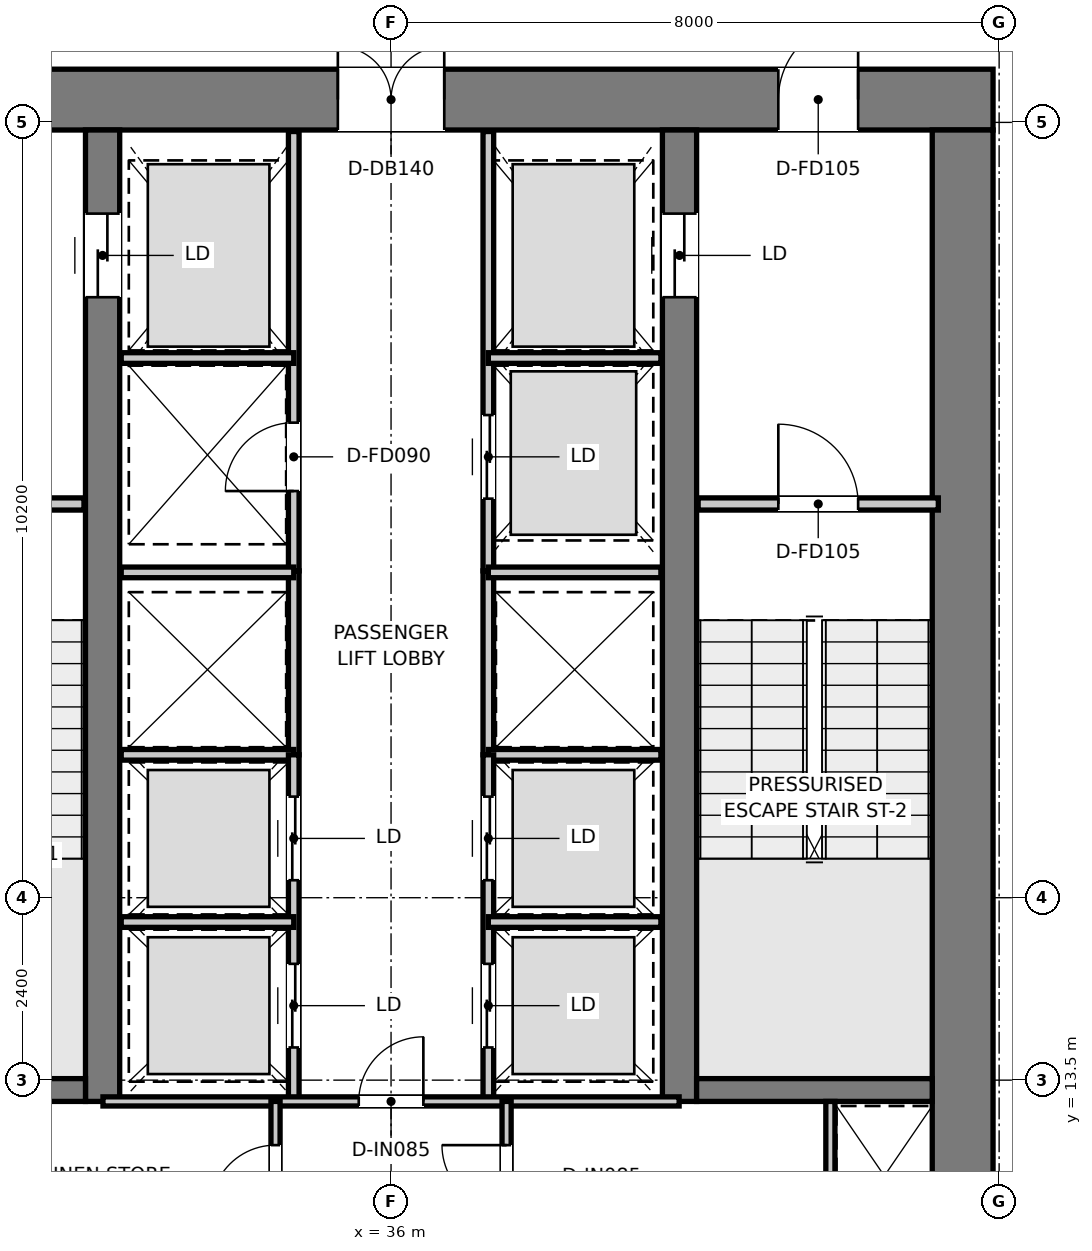
"""IFC4 building model, lengths in metres.
Left out: names, types, materials, properties, quantities, classifications, styles, units other than length and angle.
Written with IfcOpenShell. Run it as: python <this file> out.ifc"""

import sys

from ifc_helpers import new_model, si_unit, direction, frame, frame_2d, origin, place, context, subcontext, project, spatial, rectangle, extrude, element, fill, save


model = new_model("IFC4")
c1 = context("Model", 3, precision=1e-05, world=origin(), true_north=direction((0.0, 1.0)))
c2 = subcontext(c1, "Body", "Model", "MODEL_VIEW")
j1 = project(units=[si_unit("LENGTHUNIT", "METRE"), si_unit("PLANEANGLEUNIT", "RADIAN")], contexts=[c1])
p1 = place(None, origin())
s1 = spatial("IfcSite", under=j1, at=p1, CompositionType="ELEMENT")
p2 = place(p1, origin())
s2 = spatial("IfcBuilding", under=s1, at=p2, CompositionType="ELEMENT")
p3 = place(p2, frame((0.0, 0.0, 72.4)))
s3 = spatial("IfcBuildingStorey", under=s2, at=p3, CompositionType="ELEMENT", Elevation=72.4)
p4 = place(p3, frame((28.08, 26.4, 0.0), z_axis=(0.0, 0.0, 1.0), x_axis=(1.0, 0.0, 0.0)))
e1 = element("IfcWall", 1, at=p4, inside=s3, PredefinedType="SHEAR", context=c2, shape_type="SweptSolid", body=[
    extrude(rectangle(XDim=15.84, YDim=0.8, at=frame_2d((7.92, 0.0))), origin(), (0.0, 0.0, 1.0), 3.95),
])
p5 = place(p4, frame((7.22, 0.0, 0.0)))
e2 = element("IfcOpeningElement", 2, at=p5, cuts=e1, PredefinedType="OPENING", context=c2, shape_type="SweptSolid", body=[
    extrude(rectangle(XDim=1.4, YDim=2.2, at=frame_2d((0.7, 1.1))), frame((0.0, 0.41, 0.0), z_axis=(0.0, -1.0, 0.0), x_axis=(1.0, 0.0, 0.0)), (0.0, 0.0, 1.0), 0.82),
])
p6 = place(p4, frame((1.775, 0.0, 0.0)))
e3 = element("IfcOpeningElement", 3, at=p6, cuts=e1, PredefinedType="OPENING", context=c2, shape_type="SweptSolid", body=[
    extrude(rectangle(XDim=1.05, YDim=2.1, at=frame_2d((0.525, 1.05))), frame((0.0, 0.41, 0.0), z_axis=(0.0, -1.0, 0.0), x_axis=(1.0, 0.0, 0.0)), (0.0, 0.0, 1.0), 0.82),
])
p7 = place(p4, frame((13.015, 0.0, 0.0)))
e4 = element("IfcOpeningElement", 4, at=p7, cuts=e1, PredefinedType="OPENING", context=c2, shape_type="SweptSolid", body=[
    extrude(rectangle(XDim=1.05, YDim=2.1, at=frame_2d((0.525, 1.05))), frame((0.0, 0.41, 0.0), z_axis=(0.0, -1.0, 0.0), x_axis=(1.0, 0.0, 0.0)), (0.0, 0.0, 1.0), 0.82),
])
p8 = place(p3, frame((43.52, 11.3, 0.0), z_axis=(0.0, 0.0, 1.0), x_axis=(0.0, 1.0, 0.0)))
e5 = element("IfcWall", 5, at=p8, inside=s3, PredefinedType="SHEAR", context=c2, shape_type="SweptSolid", body=[
    extrude(rectangle(XDim=14.7, YDim=0.8, at=frame_2d((7.35, 0.0))), origin(), (0.0, 0.0, 1.0), 3.95),
])
p9 = place(p3, frame((32.205, 13.22, 0.0), z_axis=(0.0, 0.0, 1.0), x_axis=(0.0, 1.0, 0.0)))
e6 = element("IfcWall", 6, at=p9, inside=s3, PredefinedType="SHEAR", context=c2, shape_type="SweptSolid", body=[
    extrude(rectangle(XDim=12.78, YDim=0.45, at=frame_2d((6.39, 0.0))), origin(), (0.0, 0.0, 1.0), 3.95),
])
p10 = place(p9, frame((10.58, 0.0, 0.0)))
e7 = element("IfcOpeningElement", 7, at=p10, cuts=e6, PredefinedType="OPENING", context=c2, shape_type="SweptSolid", body=[
    extrude(rectangle(XDim=1.1, YDim=2.15, at=frame_2d((0.55, 1.075))), frame((0.0, 0.235, 0.0), z_axis=(0.0, -1.0, 0.0), x_axis=(1.0, 0.0, 0.0)), (0.0, 0.0, 1.0), 0.47),
])
p11 = place(p3, frame((39.795, 13.22, 0.0), z_axis=(0.0, 0.0, 1.0), x_axis=(0.0, 1.0, 0.0)))
e8 = element("IfcWall", 8, at=p11, inside=s3, PredefinedType="SHEAR", context=c2, shape_type="SweptSolid", body=[
    extrude(rectangle(XDim=12.78, YDim=0.45, at=frame_2d((6.39, 0.0))), origin(), (0.0, 0.0, 1.0), 3.95),
])
p12 = place(p11, frame((10.58, 0.0, 0.0)))
e9 = element("IfcOpeningElement", 9, at=p12, cuts=e8, PredefinedType="OPENING", context=c2, shape_type="SweptSolid", body=[
    extrude(rectangle(XDim=1.1, YDim=2.15, at=frame_2d((0.55, 1.075))), frame((0.0, 0.235, 0.0), z_axis=(0.0, -1.0, 0.0), x_axis=(1.0, 0.0, 0.0)), (0.0, 0.0, 1.0), 0.47),
])
for number, where, z_axis, x_axis in (
    (10, (28.88, 13.37, 0.0), (0.0, 0.0, 1.0), (1.0, 0.0, 0.0)),
    (11, (40.02, 13.37, 0.0), (0.0, 0.0, 1.0), (1.0, 0.0, 0.0)),
):
    element("IfcWall", number, at=place(p3, frame(where, z_axis=z_axis, x_axis=x_axis)), inside=s3, PredefinedType="SHEAR", context=c2, shape_type="SweptSolid", body=[
        extrude(rectangle(XDim=3.1, YDim=0.3, at=frame_2d((1.55, 0.0))), origin(), (0.0, 0.0, 1.0), 3.95),
    ])
p13 = place(p3, frame((28.8, 21.08, 0.0), z_axis=(0.0, 0.0, 1.0), x_axis=(1.0, 0.0, 0.0)))
e12 = element("IfcWall", 12, at=p13, inside=s3, PredefinedType="PARTITIONING", context=c2, shape_type="SweptSolid", body=[
    extrude(rectangle(XDim=3.16, YDim=0.16, at=frame_2d((1.58, 0.0))), origin(), (0.0, 0.0, 1.0), 3.67),
])
p14 = place(p13, frame((1.055, 0.0, 0.0)))
e13 = element("IfcOpeningElement", 13, at=p14, cuts=e12, PredefinedType="OPENING", context=c2, shape_type="SweptSolid", body=[
    extrude(rectangle(XDim=1.05, YDim=2.1, at=frame_2d((0.525, 1.05))), frame((0.0, 0.09, 0.0), z_axis=(0.0, -1.0, 0.0), x_axis=(1.0, 0.0, 0.0)), (0.0, 0.0, 1.0), 0.18),
])
p15 = place(p3, frame((40.04, 21.08, 0.0), z_axis=(0.0, 0.0, 1.0), x_axis=(1.0, 0.0, 0.0)))
e14 = element("IfcWall", 14, at=p15, inside=s3, PredefinedType="PARTITIONING", context=c2, shape_type="SweptSolid", body=[
    extrude(rectangle(XDim=3.16, YDim=0.16, at=frame_2d((1.58, 0.0))), origin(), (0.0, 0.0, 1.0), 3.67),
])
p16 = place(p15, frame((1.055, 0.0, 0.0)))
e15 = element("IfcOpeningElement", 15, at=p16, cuts=e14, PredefinedType="OPENING", context=c2, shape_type="SweptSolid", body=[
    extrude(rectangle(XDim=1.05, YDim=2.1, at=frame_2d((0.525, 1.05))), frame((0.0, 0.09, 0.0), z_axis=(0.0, -1.0, 0.0), x_axis=(1.0, 0.0, 0.0)), (0.0, 0.0, 1.0), 0.18),
])
p17 = place(p3, frame((34.72, 20.2, 0.0), z_axis=(0.0, 0.0, 1.0), x_axis=(0.0, 1.0, 0.0)))
e16 = element("IfcWall", 16, at=p17, inside=s3, PredefinedType="PARTITIONING", context=c2, shape_type="SweptSolid", body=[
    extrude(rectangle(XDim=5.78, YDim=0.14, at=frame_2d((2.89, 0.0))), origin(), (0.0, 0.0, 1.0), 2.47),
])
p18 = place(p17, frame((1.05, 0.0, 0.0)))
e17 = element("IfcOpeningElement", 17, at=p18, cuts=e16, PredefinedType="OPENING", context=c2, shape_type="SweptSolid", body=[
    extrude(rectangle(XDim=0.9, YDim=2.1, at=frame_2d((0.45, 1.05))), frame((0.0, 0.08, 0.0), z_axis=(0.0, -1.0, 0.0), x_axis=(1.0, 0.0, 0.0)), (0.0, 0.0, 1.0), 0.16),
])
p19 = place(p3, frame((37.28, 20.2, 0.0), z_axis=(0.0, 0.0, 1.0), x_axis=(0.0, 1.0, 0.0)))
e18 = element("IfcWall", 18, at=p19, inside=s3, PredefinedType="PARTITIONING", context=c2, shape_type="SweptSolid", body=[
    extrude(rectangle(XDim=5.78, YDim=0.14, at=frame_2d((2.89, 0.0))), origin(), (0.0, 0.0, 1.0), 2.47),
])
p20 = place(p19, frame((0.95, 0.0, 0.0)))
e19 = element("IfcOpeningElement", 19, at=p20, cuts=e18, PredefinedType="OPENING", context=c2, shape_type="SweptSolid", body=[
    extrude(rectangle(XDim=1.1, YDim=2.15, at=frame_2d((0.55, 1.075))), frame((0.0, 0.08, 0.0), z_axis=(0.0, -1.0, 0.0), x_axis=(1.0, 0.0, 0.0)), (0.0, 0.0, 1.0), 0.16),
])
for number, where, z_axis, x_axis in (
    (20, (32.45, 23.0, 0.0), (0.0, 0.0, 1.0), (1.0, 0.0, 0.0)),
    (21, (37.28, 23.0, 0.0), (0.0, 0.0, 1.0), (1.0, 0.0, 0.0)),
):
    element("IfcWall", number, at=place(p3, frame(where, z_axis=z_axis, x_axis=x_axis)), inside=s3, PredefinedType="PARTITIONING", context=c2, shape_type="SweptSolid", body=[
        extrude(rectangle(XDim=2.27, YDim=0.14, at=frame_2d((1.135, 0.0))), origin(), (0.0, 0.0, 1.0), 2.47),
    ])
for number, where, z_axis, x_axis in (
    (22, (34.72, 17.78, 0.0), (0.0, 0.0, 1.0), (0.0, 1.0, 0.0)),
    (23, (37.28, 17.78, 0.0), (0.0, 0.0, 1.0), (0.0, 1.0, 0.0)),
):
    element("IfcWall", number, at=place(p3, frame(where, z_axis=z_axis, x_axis=x_axis)), inside=s3, PredefinedType="PARTITIONING", context=c2, shape_type="SweptSolid", body=[
        extrude(rectangle(XDim=2.42, YDim=0.14, at=frame_2d((1.21, 0.0))), origin(), (0.0, 0.0, 1.0), 3.67),
    ])
for number, where, z_axis, x_axis in (
    (24, (32.45, 17.78, 0.0), (0.0, 0.0, 1.0), (1.0, 0.0, 0.0)),
    (25, (32.45, 20.18, 0.0), (0.0, 0.0, 1.0), (1.0, 0.0, 0.0)),
    (26, (37.28, 17.78, 0.0), (0.0, 0.0, 1.0), (1.0, 0.0, 0.0)),
    (27, (37.28, 20.18, 0.0), (0.0, 0.0, 1.0), (1.0, 0.0, 0.0)),
):
    element("IfcWall", number, at=place(p3, frame(where, z_axis=z_axis, x_axis=x_axis)), inside=s3, PredefinedType="PARTITIONING", context=c2, shape_type="SweptSolid", body=[
        extrude(rectangle(XDim=2.27, YDim=0.14, at=frame_2d((1.135, 0.0))), origin(), (0.0, 0.0, 1.0), 3.67),
    ])
p21 = place(p3, frame((34.72, 13.22, 0.0), z_axis=(0.0, 0.0, 1.0), x_axis=(0.0, 1.0, 0.0)))
e28 = element("IfcWall", 28, at=p21, inside=s3, PredefinedType="PARTITIONING", context=c2, shape_type="SweptSolid", body=[
    extrude(rectangle(XDim=4.56, YDim=0.14, at=frame_2d((2.28, 0.0))), origin(), (0.0, 0.0, 1.0), 3.67),
])
p22 = place(p21, frame((0.71, 0.0, 0.0)))
e29 = element("IfcOpeningElement", 29, at=p22, cuts=e28, PredefinedType="OPENING", context=c2, shape_type="SweptSolid", body=[
    extrude(rectangle(XDim=1.1, YDim=2.15, at=frame_2d((0.55, 1.075))), frame((0.0, 0.08, 0.0), z_axis=(0.0, -1.0, 0.0), x_axis=(1.0, 0.0, 0.0)), (0.0, 0.0, 1.0), 0.16),
])
p23 = place(p21, frame((2.91, 0.0, 0.0)))
e30 = element("IfcOpeningElement", 30, at=p23, cuts=e28, PredefinedType="OPENING", context=c2, shape_type="SweptSolid", body=[
    extrude(rectangle(XDim=1.1, YDim=2.15, at=frame_2d((0.55, 1.075))), frame((0.0, 0.08, 0.0), z_axis=(0.0, -1.0, 0.0), x_axis=(1.0, 0.0, 0.0)), (0.0, 0.0, 1.0), 0.16),
])
p24 = place(p3, frame((32.45, 15.58, 0.0), z_axis=(0.0, 0.0, 1.0), x_axis=(1.0, 0.0, 0.0)))
e31 = element("IfcWall", 31, at=p24, inside=s3, PredefinedType="PARTITIONING", context=c2, shape_type="SweptSolid", body=[
    extrude(rectangle(XDim=2.27, YDim=0.14, at=frame_2d((1.135, 0.0))), origin(), (0.0, 0.0, 1.0), 3.67),
])
p25 = place(p3, frame((37.28, 13.22, 0.0), z_axis=(0.0, 0.0, 1.0), x_axis=(0.0, 1.0, 0.0)))
e32 = element("IfcWall", 32, at=p25, inside=s3, PredefinedType="PARTITIONING", context=c2, shape_type="SweptSolid", body=[
    extrude(rectangle(XDim=4.56, YDim=0.14, at=frame_2d((2.28, 0.0))), origin(), (0.0, 0.0, 1.0), 3.67),
])
p26 = place(p25, frame((0.71, 0.0, 0.0)))
e33 = element("IfcOpeningElement", 33, at=p26, cuts=e32, PredefinedType="OPENING", context=c2, shape_type="SweptSolid", body=[
    extrude(rectangle(XDim=1.1, YDim=2.15, at=frame_2d((0.55, 1.075))), frame((0.0, 0.08, 0.0), z_axis=(0.0, -1.0, 0.0), x_axis=(1.0, 0.0, 0.0)), (0.0, 0.0, 1.0), 0.16),
])
p27 = place(p25, frame((2.91, 0.0, 0.0)))
e34 = element("IfcOpeningElement", 34, at=p27, cuts=e32, PredefinedType="OPENING", context=c2, shape_type="SweptSolid", body=[
    extrude(rectangle(XDim=1.1, YDim=2.15, at=frame_2d((0.55, 1.075))), frame((0.0, 0.08, 0.0), z_axis=(0.0, -1.0, 0.0), x_axis=(1.0, 0.0, 0.0)), (0.0, 0.0, 1.0), 0.16),
])
p28 = place(p3, frame((37.28, 15.58, 0.0), z_axis=(0.0, 0.0, 1.0), x_axis=(1.0, 0.0, 0.0)))
e35 = element("IfcWall", 35, at=p28, inside=s3, PredefinedType="PARTITIONING", context=c2, shape_type="SweptSolid", body=[
    extrude(rectangle(XDim=2.27, YDim=0.14, at=frame_2d((1.135, 0.0))), origin(), (0.0, 0.0, 1.0), 3.67),
])
p29 = place(p3, frame((41.78, 11.25, 0.0), z_axis=(0.0, 0.0, 1.0), x_axis=(0.0, 1.0, 0.0)))
e36 = element("IfcWall", 36, at=p29, inside=s3, PredefinedType="PARTITIONING", context=c2, shape_type="SweptSolid", body=[
    extrude(rectangle(XDim=1.97, YDim=0.12, at=frame_2d((0.985, 0.0))), origin(), (0.0, 0.0, 1.0), 3.67),
])
p30 = place(p3, frame((32.21, 13.22, 0.0), z_axis=(0.0, 0.0, 1.0), x_axis=(1.0, 0.0, 0.0)))
e37 = element("IfcWall", 37, at=p30, inside=s3, PredefinedType="PARTITIONING", context=c2, shape_type="SweptSolid", body=[
    extrude(rectangle(XDim=7.58, YDim=0.12, at=frame_2d((3.79, 0.0))), origin(), (0.0, 0.0, 1.0), 3.67),
])
p31 = place(p30, frame((3.365, 0.0, 0.0)))
e38 = element("IfcOpeningElement", 38, at=p31, cuts=e37, PredefinedType="OPENING", context=c2, shape_type="SweptSolid", body=[
    extrude(rectangle(XDim=0.85, YDim=2.1, at=frame_2d((0.425, 1.05))), frame((0.0, 0.07, 0.0), z_axis=(0.0, -1.0, 0.0), x_axis=(1.0, 0.0, 0.0)), (0.0, 0.0, 1.0), 0.14),
])
p32 = place(p3, frame((34.48, 11.25, 0.0), z_axis=(0.0, 0.0, 1.0), x_axis=(0.0, 1.0, 0.0)))
e39 = element("IfcWall", 39, at=p32, inside=s3, PredefinedType="PARTITIONING", context=c2, shape_type="SweptSolid", body=[
    extrude(rectangle(XDim=1.97, YDim=0.12, at=frame_2d((0.985, 0.0))), origin(), (0.0, 0.0, 1.0), 3.67),
])
p33 = place(p32, frame((0.545, 0.0, 0.0)))
e40 = element("IfcOpeningElement", 40, at=p33, cuts=e39, PredefinedType="OPENING", context=c2, shape_type="SweptSolid", body=[
    extrude(rectangle(XDim=0.85, YDim=2.1, at=frame_2d((0.425, 1.05))), frame((0.0, 0.07, 0.0), z_axis=(0.0, -1.0, 0.0), x_axis=(1.0, 0.0, 0.0)), (0.0, 0.0, 1.0), 0.14),
])
p34 = place(p3, frame((37.52, 11.25, 0.0), z_axis=(0.0, 0.0, 1.0), x_axis=(0.0, 1.0, 0.0)))
e41 = element("IfcWall", 41, at=p34, inside=s3, PredefinedType="PARTITIONING", context=c2, shape_type="SweptSolid", body=[
    extrude(rectangle(XDim=1.97, YDim=0.12, at=frame_2d((0.985, 0.0))), origin(), (0.0, 0.0, 1.0), 3.67),
])
p35 = place(p34, frame((0.545, 0.0, 0.0)))
e42 = element("IfcOpeningElement", 42, at=p35, cuts=e41, PredefinedType="OPENING", context=c2, shape_type="SweptSolid", body=[
    extrude(rectangle(XDim=0.85, YDim=2.1, at=frame_2d((0.425, 1.05))), frame((0.0, 0.07, 0.0), z_axis=(0.0, -1.0, 0.0), x_axis=(1.0, 0.0, 0.0)), (0.0, 0.0, 1.0), 0.14),
])
p36 = place(p16, origin())
e43 = element("IfcDoor", 43, at=p36, inside=s3, OperationType="SINGLE_SWING_LEFT", PredefinedType="DOOR", context=c2, shape_type="SweptSolid", body=[
    extrude(rectangle(XDim=1.05, YDim=2.1, at=frame_2d((0.525, 1.05))), frame((0.0, 0.025, 0.0), z_axis=(0.0, -1.0, 0.0), x_axis=(1.0, 0.0, 0.0)), (0.0, 0.0, 1.0), 0.05),
])
fill(e15, e43)
p37 = place(p5, origin())
e44 = element("IfcDoor", 44, at=p37, inside=s3, OperationType="DOUBLE_DOOR_SINGLE_SWING", PredefinedType="DOOR", context=c2, shape_type="SweptSolid", body=[
    extrude(rectangle(XDim=1.4, YDim=2.2, at=frame_2d((0.7, 1.1))), frame((0.0, 0.025, 0.0), z_axis=(0.0, -1.0, 0.0), x_axis=(1.0, 0.0, 0.0)), (0.0, 0.0, 1.0), 0.05),
])
fill(e2, e44)
p38 = place(p7, origin())
e45 = element("IfcDoor", 45, at=p38, inside=s3, OperationType="SINGLE_SWING_RIGHT", PredefinedType="DOOR", context=c2, shape_type="SweptSolid", body=[
    extrude(rectangle(XDim=1.05, YDim=2.1, at=frame_2d((0.525, 1.05))), frame((0.0, 0.025, 0.0), z_axis=(0.0, -1.0, 0.0), x_axis=(1.0, 0.0, 0.0)), (0.0, 0.0, 1.0), 0.05),
])
fill(e4, e45)
p39 = place(p10, origin())
e46 = element("IfcDoor", 46, at=p39, inside=s3, OperationType="DOUBLE_DOOR_SLIDING", PredefinedType="DOOR", context=c2, shape_type="SweptSolid", body=[
    extrude(rectangle(XDim=1.1, YDim=2.15, at=frame_2d((0.55, 1.075))), frame((0.0, 0.025, 0.0), z_axis=(0.0, -1.0, 0.0), x_axis=(1.0, 0.0, 0.0)), (0.0, 0.0, 1.0), 0.05),
])
fill(e7, e46)
p40 = place(p12, origin())
e47 = element("IfcDoor", 47, at=p40, inside=s3, OperationType="DOUBLE_DOOR_SLIDING", PredefinedType="DOOR", context=c2, shape_type="SweptSolid", body=[
    extrude(rectangle(XDim=1.1, YDim=2.15, at=frame_2d((0.55, 1.075))), frame((0.0, 0.025, 0.0), z_axis=(0.0, -1.0, 0.0), x_axis=(1.0, 0.0, 0.0)), (0.0, 0.0, 1.0), 0.05),
])
fill(e9, e47)
p41 = place(p18, origin())
e48 = element("IfcDoor", 48, at=p41, inside=s3, OperationType="SINGLE_SWING_LEFT", PredefinedType="DOOR", context=c2, shape_type="SweptSolid", body=[
    extrude(rectangle(XDim=0.9, YDim=2.1, at=frame_2d((0.45, 1.05))), frame((0.0, 0.025, 0.0), z_axis=(0.0, -1.0, 0.0), x_axis=(1.0, 0.0, 0.0)), (0.0, 0.0, 1.0), 0.05),
])
fill(e17, e48)
p42 = place(p20, origin())
e49 = element("IfcDoor", 49, at=p42, inside=s3, OperationType="DOUBLE_DOOR_SLIDING", PredefinedType="DOOR", context=c2, shape_type="SweptSolid", body=[
    extrude(rectangle(XDim=1.1, YDim=2.15, at=frame_2d((0.55, 1.075))), frame((0.0, 0.025, 0.0), z_axis=(0.0, -1.0, 0.0), x_axis=(1.0, 0.0, 0.0)), (0.0, 0.0, 1.0), 0.05),
])
fill(e19, e49)
p43 = place(p22, origin())
e50 = element("IfcDoor", 50, at=p43, inside=s3, OperationType="DOUBLE_DOOR_SLIDING", PredefinedType="DOOR", context=c2, shape_type="SweptSolid", body=[
    extrude(rectangle(XDim=1.1, YDim=2.15, at=frame_2d((0.55, 1.075))), frame((0.0, 0.025, 0.0), z_axis=(0.0, -1.0, 0.0), x_axis=(1.0, 0.0, 0.0)), (0.0, 0.0, 1.0), 0.05),
])
fill(e29, e50)
p44 = place(p23, origin())
e51 = element("IfcDoor", 51, at=p44, inside=s3, OperationType="DOUBLE_DOOR_SLIDING", PredefinedType="DOOR", context=c2, shape_type="SweptSolid", body=[
    extrude(rectangle(XDim=1.1, YDim=2.15, at=frame_2d((0.55, 1.075))), frame((0.0, 0.025, 0.0), z_axis=(0.0, -1.0, 0.0), x_axis=(1.0, 0.0, 0.0)), (0.0, 0.0, 1.0), 0.05),
])
fill(e30, e51)
p45 = place(p26, origin())
e52 = element("IfcDoor", 52, at=p45, inside=s3, OperationType="DOUBLE_DOOR_SLIDING", PredefinedType="DOOR", context=c2, shape_type="SweptSolid", body=[
    extrude(rectangle(XDim=1.1, YDim=2.15, at=frame_2d((0.55, 1.075))), frame((0.0, 0.025, 0.0), z_axis=(0.0, -1.0, 0.0), x_axis=(1.0, 0.0, 0.0)), (0.0, 0.0, 1.0), 0.05),
])
fill(e33, e52)
p46 = place(p27, origin())
e53 = element("IfcDoor", 53, at=p46, inside=s3, OperationType="DOUBLE_DOOR_SLIDING", PredefinedType="DOOR", context=c2, shape_type="SweptSolid", body=[
    extrude(rectangle(XDim=1.1, YDim=2.15, at=frame_2d((0.55, 1.075))), frame((0.0, 0.025, 0.0), z_axis=(0.0, -1.0, 0.0), x_axis=(1.0, 0.0, 0.0)), (0.0, 0.0, 1.0), 0.05),
])
fill(e34, e53)
p47 = place(p31, origin())
e54 = element("IfcDoor", 54, at=p47, inside=s3, OperationType="SINGLE_SWING_RIGHT", PredefinedType="DOOR", context=c2, shape_type="SweptSolid", body=[
    extrude(rectangle(XDim=0.85, YDim=2.1, at=frame_2d((0.425, 1.05))), frame((0.0, 0.025, 0.0), z_axis=(0.0, -1.0, 0.0), x_axis=(1.0, 0.0, 0.0)), (0.0, 0.0, 1.0), 0.05),
])
fill(e38, e54)
p48 = place(p33, origin())
e55 = element("IfcDoor", 55, at=p48, inside=s3, OperationType="SINGLE_SWING_LEFT", PredefinedType="DOOR", context=c2, shape_type="SweptSolid", body=[
    extrude(rectangle(XDim=0.85, YDim=2.1, at=frame_2d((0.425, 1.05))), frame((0.0, 0.025, 0.0), z_axis=(0.0, -1.0, 0.0), x_axis=(1.0, 0.0, 0.0)), (0.0, 0.0, 1.0), 0.05),
])
fill(e40, e55)
p49 = place(p35, origin())
e56 = element("IfcDoor", 56, at=p49, inside=s3, OperationType="SINGLE_SWING_RIGHT", PredefinedType="DOOR", context=c2, shape_type="SweptSolid", body=[
    extrude(rectangle(XDim=0.85, YDim=2.1, at=frame_2d((0.425, 1.05))), frame((0.0, 0.025, 0.0), z_axis=(0.0, -1.0, 0.0), x_axis=(1.0, 0.0, 0.0)), (0.0, 0.0, 1.0), 0.05),
])
fill(e42, e56)
save(model, sys.argv[1])
